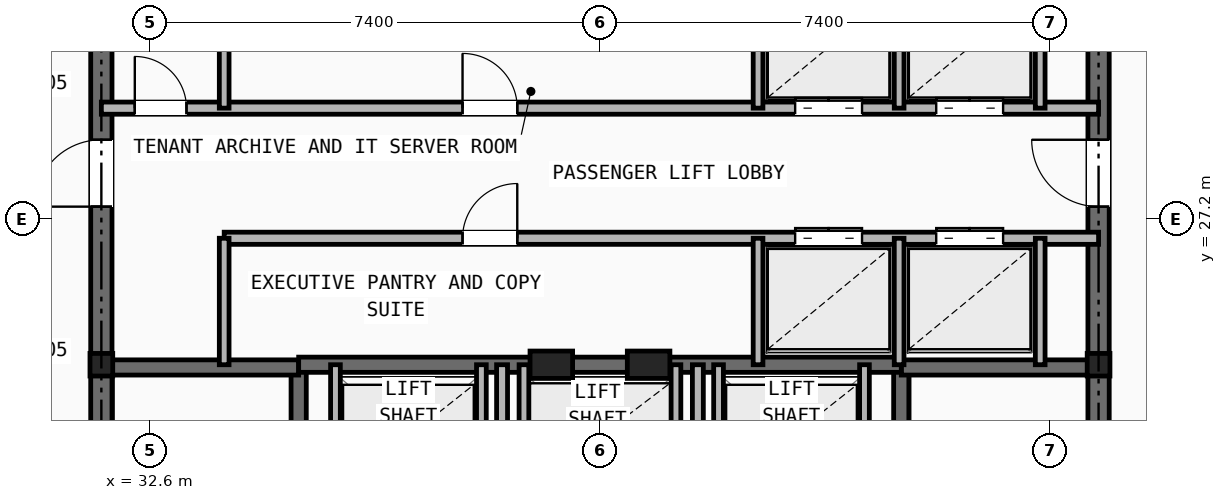
"""IFC4 building model, lengths in metres.
Left out: names, types, materials, properties, quantities, classifications, styles, units other than length and angle.
Written with IfcOpenShell. Run it as: python <this file> out.ifc"""

import sys

from ifc_helpers import new_model, si_unit, direction, frame, frame_2d, origin, origin_2d, place, context, subcontext, project, spatial, rectangle, i_section, extrude, element, fill, save


model = new_model("IFC4")
c1 = context("Model", 3, precision=1e-05, world=origin(), true_north=direction((0.0, 1.0)))
c2 = subcontext(c1, "Body", "Model", "MODEL_VIEW")
j1 = project(units=[si_unit("LENGTHUNIT", "METRE"), si_unit("PLANEANGLEUNIT", "RADIAN")], contexts=[c1])
p1 = place(None, origin())
s1 = spatial("IfcSite", under=j1, at=p1, CompositionType="ELEMENT")
p2 = place(p1, origin())
s2 = spatial("IfcBuilding", under=s1, at=p2, CompositionType="ELEMENT")
p3 = place(p2, frame((0.0, 0.0, 239.9)))
s3 = spatial("IfcBuildingStorey", under=s2, at=p3, CompositionType="ELEMENT", Elevation=239.9)
for number, where, z_axis, x_axis in (
    (1, (31.8, 24.8, 0.0), (0.0, 0.0, 1.0), (1.0, 0.0, 0.0)),
    (2, (48.2, 24.8, 0.0), (0.0, 0.0, 1.0), (1.0, 0.0, 0.0)),
):
    element("IfcColumn", number, at=place(p3, frame(where, z_axis=z_axis, x_axis=x_axis)), inside=s3, PredefinedType="COLUMN", context=c2, shape_type="SweptSolid", body=[
        extrude(i_section(OverallWidth=0.374, OverallDepth=0.372, WebThickness=0.016, FlangeThickness=0.026, at=origin_2d()), origin(), (0.0, 0.0, 1.0), 3.5),
    ])
for number, where, z_axis, x_axis in (
    (3, (39.2, 24.8, 0.0), (0.0, 0.0, 1.0), (1.0, 0.0, 0.0)),
    (4, (40.8, 24.8, 0.0), (0.0, 0.0, 1.0), (1.0, 0.0, 0.0)),
):
    element("IfcColumn", number, at=place(p3, frame(where, z_axis=z_axis, x_axis=x_axis)), inside=s3, PredefinedType="PILASTER", context=c2, shape_type="SweptSolid", body=[
        extrude(rectangle(XDim=0.7, YDim=0.45, at=origin_2d()), origin(), (0.0, 0.0, 1.0), 3.5),
    ])
p4 = place(p3, frame((31.8, 16.4, 0.0), z_axis=(0.0, 0.0, 1.0), x_axis=(0.0, 1.0, 0.0)))
e5 = element("IfcWall", 5, at=p4, inside=s3, PredefinedType="SHEAR", context=c2, shape_type="SweptSolid", body=[
    extrude(rectangle(XDim=14.8, YDim=0.35, at=frame_2d((7.4, 0.0))), origin(), (0.0, 0.0, 1.0), 3.25),
])
p5 = place(p4, frame((11.0, 0.0, 0.0)))
e6 = element("IfcOpeningElement", 6, at=p5, cuts=e5, PredefinedType="OPENING", context=c2, shape_type="SweptSolid", body=[
    extrude(rectangle(XDim=1.1, YDim=2.15, at=frame_2d((0.55, 1.075))), frame((0.0, 0.185, 0.0), z_axis=(0.0, -1.0, 0.0), x_axis=(1.0, 0.0, 0.0)), (0.0, 0.0, 1.0), 0.37),
])
p6 = place(p3, frame((48.2, 16.4, 0.0), z_axis=(0.0, 0.0, 1.0), x_axis=(0.0, 1.0, 0.0)))
e7 = element("IfcWall", 7, at=p6, inside=s3, PredefinedType="SHEAR", context=c2, shape_type="SweptSolid", body=[
    extrude(rectangle(XDim=14.8, YDim=0.35, at=frame_2d((7.4, 0.0))), origin(), (0.0, 0.0, 1.0), 3.25),
])
p7 = place(p6, frame((11.0, 0.0, 0.0)))
e8 = element("IfcOpeningElement", 8, at=p7, cuts=e7, PredefinedType="OPENING", context=c2, shape_type="SweptSolid", body=[
    extrude(rectangle(XDim=1.1, YDim=2.15, at=frame_2d((0.55, 1.075))), frame((0.0, 0.185, 0.0), z_axis=(0.0, -1.0, 0.0), x_axis=(1.0, 0.0, 0.0)), (0.0, 0.0, 1.0), 0.37),
])
p8 = place(p3, frame((35.045, 16.4, 0.0), z_axis=(0.0, 0.0, 1.0), x_axis=(0.0, 1.0, 0.0)))
e9 = element("IfcWall", 9, at=p8, inside=s3, PredefinedType="SHEAR", context=c2, shape_type="SweptSolid", body=[
    extrude(rectangle(XDim=8.4, YDim=0.25, at=frame_2d((4.2, 0.0))), origin(), (0.0, 0.0, 1.0), 3.25),
])
p9 = place(p8, frame((0.45, 0.0, 0.0)))
e10 = element("IfcOpeningElement", 10, at=p9, cuts=e9, PredefinedType="OPENING", context=c2, shape_type="SweptSolid", body=[
    extrude(rectangle(XDim=0.95, YDim=2.1, at=frame_2d((0.475, 1.05))), frame((0.0, 0.135, 0.0), z_axis=(0.0, -1.0, 0.0), x_axis=(1.0, 0.0, 0.0)), (0.0, 0.0, 1.0), 0.27),
])
p10 = place(p3, frame((31.8, 24.755, 0.0), z_axis=(0.0, 0.0, 1.0), x_axis=(1.0, 0.0, 0.0)))
e11 = element("IfcWall", 11, at=p10, inside=s3, PredefinedType="SHEAR", context=c2, shape_type="SweptSolid", body=[
    extrude(rectangle(XDim=3.245, YDim=0.25, at=frame_2d((1.623, 0.0))), origin(), (0.0, 0.0, 1.0), 3.25),
])
p11 = place(p3, frame((44.955, 16.4, 0.0), z_axis=(0.0, 0.0, 1.0), x_axis=(0.0, 1.0, 0.0)))
e12 = element("IfcWall", 12, at=p11, inside=s3, PredefinedType="SHEAR", context=c2, shape_type="SweptSolid", body=[
    extrude(rectangle(XDim=8.4, YDim=0.25, at=frame_2d((4.2, 0.0))), origin(), (0.0, 0.0, 1.0), 3.25),
])
p12 = place(p11, frame((0.45, 0.0, 0.0)))
e13 = element("IfcOpeningElement", 13, at=p12, cuts=e12, PredefinedType="OPENING", context=c2, shape_type="SweptSolid", body=[
    extrude(rectangle(XDim=0.95, YDim=2.1, at=frame_2d((0.475, 1.05))), frame((0.0, 0.135, 0.0), z_axis=(0.0, -1.0, 0.0), x_axis=(1.0, 0.0, 0.0)), (0.0, 0.0, 1.0), 0.27),
])
p13 = place(p3, frame((44.955, 24.755, 0.0), z_axis=(0.0, 0.0, 1.0), x_axis=(1.0, 0.0, 0.0)))
e14 = element("IfcWall", 14, at=p13, inside=s3, PredefinedType="SHEAR", context=c2, shape_type="SweptSolid", body=[
    extrude(rectangle(XDim=3.245, YDim=0.25, at=frame_2d((1.623, 0.0))), origin(), (0.0, 0.0, 1.0), 3.25),
])
p14 = place(p3, frame((35.045, 24.8, 0.0), z_axis=(0.0, 0.0, 1.0), x_axis=(1.0, 0.0, 0.0)))
e15 = element("IfcWall", 15, at=p14, inside=s3, PredefinedType="SHEAR", context=c2, shape_type="SweptSolid", body=[
    extrude(rectangle(XDim=9.91, YDim=0.25, at=frame_2d((4.955, 0.0))), origin(), (0.0, 0.0, 1.0), 3.25),
])
p15 = place(p3, frame((38.39, 16.4, 0.0), z_axis=(0.0, 0.0, 1.0), x_axis=(0.0, 1.0, 0.0)))
e16 = element("IfcWall", 16, at=p15, inside=s3, PredefinedType="PARTITIONING", context=c2, shape_type="SweptSolid", body=[
    extrude(rectangle(XDim=8.4, YDim=0.18, at=frame_2d((4.2, 0.0))), origin(), (0.0, 0.0, 1.0), 2.705),
])
p16 = place(p15, frame((3.8, 0.0, 0.0)))
e17 = element("IfcOpeningElement", 17, at=p16, cuts=e16, PredefinedType="OPENING", context=c2, shape_type="SweptSolid", body=[
    extrude(rectangle(XDim=0.95, YDim=2.1, at=frame_2d((0.475, 1.05))), frame((0.0, 0.1, 0.0), z_axis=(0.0, -1.0, 0.0), x_axis=(1.0, 0.0, 0.0)), (0.0, 0.0, 1.0), 0.2),
])
p17 = place(p3, frame((41.61, 16.4, 0.0), z_axis=(0.0, 0.0, 1.0), x_axis=(0.0, 1.0, 0.0)))
e18 = element("IfcWall", 18, at=p17, inside=s3, PredefinedType="PARTITIONING", context=c2, shape_type="SweptSolid", body=[
    extrude(rectangle(XDim=8.4, YDim=0.18, at=frame_2d((4.2, 0.0))), origin(), (0.0, 0.0, 1.0), 2.705),
])
for number, where, z_axis, x_axis in (
    (19, (35.65, 22.48, 0.0), (0.0, 0.0, 1.0), (0.0, 1.0, 0.0)),
    (20, (38.05, 22.48, 0.0), (0.0, 0.0, 1.0), (0.0, 1.0, 0.0)),
    (21, (41.95, 22.48, 0.0), (0.0, 0.0, 1.0), (0.0, 1.0, 0.0)),
    (22, (44.35, 22.48, 0.0), (0.0, 0.0, 1.0), (0.0, 1.0, 0.0)),
    (23, (38.75, 22.48, 0.0), (0.0, 0.0, 1.0), (0.0, 1.0, 0.0)),
    (24, (41.25, 22.48, 0.0), (0.0, 0.0, 1.0), (0.0, 1.0, 0.0)),
):
    element("IfcWall", number, at=place(p3, frame(where, z_axis=z_axis, x_axis=x_axis)), inside=s3, PredefinedType="SOLIDWALL", context=c2, shape_type="SweptSolid", body=[
        extrude(rectangle(XDim=2.32, YDim=0.16, at=frame_2d((1.16, 0.0))), origin(), (0.0, 0.0, 1.0), 3.25),
    ])
p18 = place(p3, frame((31.8, 29.02, 0.0), z_axis=(0.0, 0.0, 1.0), x_axis=(1.0, 0.0, 0.0)))
e25 = element("IfcWall", 25, at=p18, inside=s3, PredefinedType="SOLIDWALL", context=c2, shape_type="SweptSolid", body=[
    extrude(rectangle(XDim=16.4, YDim=0.2, at=frame_2d((8.2, 0.0))), origin(), (0.0, 0.0, 1.0), 2.705),
])
p19 = place(p18, frame((0.55, 0.0, 0.0)))
e26 = element("IfcOpeningElement", 26, at=p19, cuts=e25, PredefinedType="OPENING", context=c2, shape_type="SweptSolid", body=[
    extrude(rectangle(XDim=0.85, YDim=2.05, at=frame_2d((0.425, 1.025))), frame((0.0, 0.11, 0.0), z_axis=(0.0, -1.0, 0.0), x_axis=(1.0, 0.0, 0.0)), (0.0, 0.0, 1.0), 0.22),
])
p20 = place(p18, frame((5.94, 0.0, 0.0)))
e27 = element("IfcOpeningElement", 27, at=p20, cuts=e25, PredefinedType="OPENING", context=c2, shape_type="SweptSolid", body=[
    extrude(rectangle(XDim=0.9, YDim=2.1, at=frame_2d((0.45, 1.05))), frame((0.0, 0.11, 0.0), z_axis=(0.0, -1.0, 0.0), x_axis=(1.0, 0.0, 0.0)), (0.0, 0.0, 1.0), 0.22),
])
p21 = place(p18, frame((11.41, 0.0, 0.0)))
e28 = element("IfcOpeningElement", 28, at=p21, cuts=e25, PredefinedType="OPENING", context=c2, shape_type="SweptSolid", body=[
    extrude(rectangle(XDim=1.1, YDim=2.15, at=frame_2d((0.55, 1.075))), frame((0.0, 0.11, 0.0), z_axis=(0.0, -1.0, 0.0), x_axis=(1.0, 0.0, 0.0)), (0.0, 0.0, 1.0), 0.22),
])
p22 = place(p18, frame((13.73, 0.0, 0.0)))
e29 = element("IfcOpeningElement", 29, at=p22, cuts=e25, PredefinedType="OPENING", context=c2, shape_type="SweptSolid", body=[
    extrude(rectangle(XDim=1.1, YDim=2.15, at=frame_2d((0.55, 1.075))), frame((0.0, 0.11, 0.0), z_axis=(0.0, -1.0, 0.0), x_axis=(1.0, 0.0, 0.0)), (0.0, 0.0, 1.0), 0.22),
])
p23 = place(p3, frame((33.82, 26.88, 0.0), z_axis=(0.0, 0.0, 1.0), x_axis=(1.0, 0.0, 0.0)))
e30 = element("IfcWall", 30, at=p23, inside=s3, PredefinedType="SOLIDWALL", context=c2, shape_type="SweptSolid", body=[
    extrude(rectangle(XDim=14.38, YDim=0.2, at=frame_2d((7.19, 0.0))), origin(), (0.0, 0.0, 1.0), 2.705),
])
p24 = place(p23, frame((3.92, 0.0, 0.0)))
e31 = element("IfcOpeningElement", 31, at=p24, cuts=e30, PredefinedType="OPENING", context=c2, shape_type="SweptSolid", body=[
    extrude(rectangle(XDim=0.9, YDim=2.1, at=frame_2d((0.45, 1.05))), frame((0.0, 0.11, 0.0), z_axis=(0.0, -1.0, 0.0), x_axis=(1.0, 0.0, 0.0)), (0.0, 0.0, 1.0), 0.22),
])
p25 = place(p23, frame((9.39, 0.0, 0.0)))
e32 = element("IfcOpeningElement", 32, at=p25, cuts=e30, PredefinedType="OPENING", context=c2, shape_type="SweptSolid", body=[
    extrude(rectangle(XDim=1.1, YDim=2.15, at=frame_2d((0.55, 1.075))), frame((0.0, 0.11, 0.0), z_axis=(0.0, -1.0, 0.0), x_axis=(1.0, 0.0, 0.0)), (0.0, 0.0, 1.0), 0.22),
])
p26 = place(p23, frame((11.71, 0.0, 0.0)))
e33 = element("IfcOpeningElement", 33, at=p26, cuts=e30, PredefinedType="OPENING", context=c2, shape_type="SweptSolid", body=[
    extrude(rectangle(XDim=1.1, YDim=2.15, at=frame_2d((0.55, 1.075))), frame((0.0, 0.11, 0.0), z_axis=(0.0, -1.0, 0.0), x_axis=(1.0, 0.0, 0.0)), (0.0, 0.0, 1.0), 0.22),
])
p27 = place(p3, frame((33.82, 29.02, 0.0), z_axis=(0.0, 0.0, 1.0), x_axis=(0.0, 1.0, 0.0)))
e34 = element("IfcWall", 34, at=p27, inside=s3, PredefinedType="SOLIDWALL", context=c2, shape_type="SweptSolid", body=[
    extrude(rectangle(XDim=2.18, YDim=0.16, at=frame_2d((1.09, 0.0))), origin(), (0.0, 0.0, 1.0), 2.705),
])
p28 = place(p3, frame((33.82, 24.8, 0.0), z_axis=(0.0, 0.0, 1.0), x_axis=(0.0, 1.0, 0.0)))
e35 = element("IfcWall", 35, at=p28, inside=s3, PredefinedType="SOLIDWALL", context=c2, shape_type="SweptSolid", body=[
    extrude(rectangle(XDim=2.08, YDim=0.16, at=frame_2d((1.04, 0.0))), origin(), (0.0, 0.0, 1.0), 3.25),
])
for number, where, z_axis, x_axis in (
    (36, (42.6, 29.02, 0.0), (0.0, 0.0, 1.0), (0.0, 1.0, 0.0)),
    (37, (44.92, 29.02, 0.0), (0.0, 0.0, 1.0), (0.0, 1.0, 0.0)),
    (38, (47.24, 29.02, 0.0), (0.0, 0.0, 1.0), (0.0, 1.0, 0.0)),
):
    element("IfcWall", number, at=place(p3, frame(where, z_axis=z_axis, x_axis=x_axis)), inside=s3, PredefinedType="SOLIDWALL", context=c2, shape_type="SweptSolid", body=[
        extrude(rectangle(XDim=2.18, YDim=0.16, at=frame_2d((1.09, 0.0))), origin(), (0.0, 0.0, 1.0), 2.705),
    ])
for number, where, z_axis, x_axis in (
    (39, (42.6, 24.8, 0.0), (0.0, 0.0, 1.0), (0.0, 1.0, 0.0)),
    (40, (44.92, 24.8, 0.0), (0.0, 0.0, 1.0), (0.0, 1.0, 0.0)),
    (41, (47.24, 24.8, 0.0), (0.0, 0.0, 1.0), (0.0, 1.0, 0.0)),
):
    element("IfcWall", number, at=place(p3, frame(where, z_axis=z_axis, x_axis=x_axis)), inside=s3, PredefinedType="SOLIDWALL", context=c2, shape_type="SweptSolid", body=[
        extrude(rectangle(XDim=2.08, YDim=0.16, at=frame_2d((1.04, 0.0))), origin(), (0.0, 0.0, 1.0), 3.25),
    ])
p29 = place(p19, origin())
e42 = element("IfcDoor", 42, at=p29, inside=s3, OperationType="SINGLE_SWING_LEFT", PredefinedType="DOOR", context=c2, shape_type="SweptSolid", body=[
    extrude(rectangle(XDim=0.85, YDim=2.05, at=frame_2d((0.425, 1.025))), frame((0.0, 0.025, 0.0), z_axis=(0.0, -1.0, 0.0), x_axis=(1.0, 0.0, 0.0)), (0.0, 0.0, 1.0), 0.05),
])
fill(e26, e42)
p30 = place(p5, origin())
e43 = element("IfcDoor", 43, at=p30, inside=s3, OperationType="SINGLE_SWING_LEFT", PredefinedType="DOOR", context=c2, shape_type="SweptSolid", body=[
    extrude(rectangle(XDim=1.1, YDim=2.15, at=frame_2d((0.55, 1.075))), frame((0.0, 0.025, 0.0), z_axis=(0.0, -1.0, 0.0), x_axis=(1.0, 0.0, 0.0)), (0.0, 0.0, 1.0), 0.05),
])
fill(e6, e43)
p31 = place(p7, origin())
e44 = element("IfcDoor", 44, at=p31, inside=s3, OperationType="SINGLE_SWING_RIGHT", PredefinedType="DOOR", context=c2, shape_type="SweptSolid", body=[
    extrude(rectangle(XDim=1.1, YDim=2.15, at=frame_2d((0.55, 1.075))), frame((0.0, 0.025, 0.0), z_axis=(0.0, -1.0, 0.0), x_axis=(1.0, 0.0, 0.0)), (0.0, 0.0, 1.0), 0.05),
])
fill(e8, e44)
p32 = place(p20, origin())
e45 = element("IfcDoor", 45, at=p32, inside=s3, OperationType="SINGLE_SWING_LEFT", PredefinedType="DOOR", context=c2, shape_type="SweptSolid", body=[
    extrude(rectangle(XDim=0.9, YDim=2.1, at=frame_2d((0.45, 1.05))), frame((0.0, 0.025, 0.0), z_axis=(0.0, -1.0, 0.0), x_axis=(1.0, 0.0, 0.0)), (0.0, 0.0, 1.0), 0.05),
])
fill(e27, e45)
p33 = place(p24, origin())
e46 = element("IfcDoor", 46, at=p33, inside=s3, OperationType="SINGLE_SWING_RIGHT", PredefinedType="DOOR", context=c2, shape_type="SweptSolid", body=[
    extrude(rectangle(XDim=0.9, YDim=2.1, at=frame_2d((0.45, 1.05))), frame((0.0, 0.025, 0.0), z_axis=(0.0, -1.0, 0.0), x_axis=(1.0, 0.0, 0.0)), (0.0, 0.0, 1.0), 0.05),
])
fill(e31, e46)
p34 = place(p21, origin())
e47 = element("IfcDoor", 47, at=p34, inside=s3, OperationType="DOUBLE_DOOR_SLIDING", PredefinedType="DOOR", context=c2, shape_type="SweptSolid", body=[
    extrude(rectangle(XDim=1.1, YDim=2.15, at=frame_2d((0.55, 1.075))), frame((0.0, 0.025, 0.0), z_axis=(0.0, -1.0, 0.0), x_axis=(1.0, 0.0, 0.0)), (0.0, 0.0, 1.0), 0.05),
])
fill(e28, e47)
p35 = place(p22, origin())
e48 = element("IfcDoor", 48, at=p35, inside=s3, OperationType="DOUBLE_DOOR_SLIDING", PredefinedType="DOOR", context=c2, shape_type="SweptSolid", body=[
    extrude(rectangle(XDim=1.1, YDim=2.15, at=frame_2d((0.55, 1.075))), frame((0.0, 0.025, 0.0), z_axis=(0.0, -1.0, 0.0), x_axis=(1.0, 0.0, 0.0)), (0.0, 0.0, 1.0), 0.05),
])
fill(e29, e48)
p36 = place(p25, origin())
e49 = element("IfcDoor", 49, at=p36, inside=s3, OperationType="DOUBLE_DOOR_SLIDING", PredefinedType="DOOR", context=c2, shape_type="SweptSolid", body=[
    extrude(rectangle(XDim=1.1, YDim=2.15, at=frame_2d((0.55, 1.075))), frame((0.0, 0.025, 0.0), z_axis=(0.0, -1.0, 0.0), x_axis=(1.0, 0.0, 0.0)), (0.0, 0.0, 1.0), 0.05),
])
fill(e32, e49)
p37 = place(p26, origin())
e50 = element("IfcDoor", 50, at=p37, inside=s3, OperationType="DOUBLE_DOOR_SLIDING", PredefinedType="DOOR", context=c2, shape_type="SweptSolid", body=[
    extrude(rectangle(XDim=1.1, YDim=2.15, at=frame_2d((0.55, 1.075))), frame((0.0, 0.025, 0.0), z_axis=(0.0, -1.0, 0.0), x_axis=(1.0, 0.0, 0.0)), (0.0, 0.0, 1.0), 0.05),
])
fill(e33, e50)
save(model, sys.argv[1])
